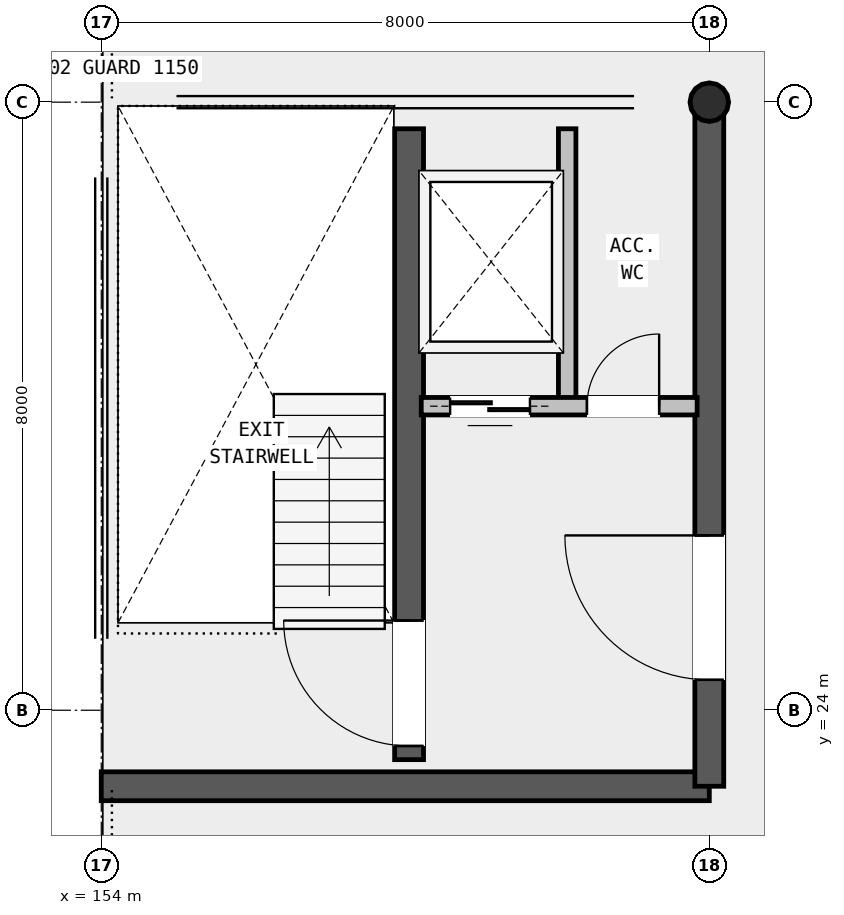
"""IFC4 building model, lengths in metres.
Left out: names, types, materials, properties, quantities, classifications, styles, units other than length and angle.
Written with IfcOpenShell. Run it as: python <this file> out.ifc"""

import sys

from ifc_helpers import new_model, si_unit, direction, frame, frame_2d, origin, origin_2d, place, context, subcontext, project, spatial, rectangle, hollow_circle, extrude, element, fill, save


model = new_model("IFC4")
c1 = context("Model", 3, precision=1e-05, world=origin(), true_north=direction((0.0, 1.0)))
c2 = subcontext(c1, "Body", "Model", "MODEL_VIEW")
j1 = project(units=[si_unit("LENGTHUNIT", "METRE"), si_unit("PLANEANGLEUNIT", "RADIAN")], contexts=[c1])
p1 = place(None, origin())
s1 = spatial("IfcSite", under=j1, at=p1, CompositionType="ELEMENT")
p2 = place(p1, origin())
s2 = spatial("IfcBuilding", under=s1, at=p2, CompositionType="ELEMENT")
p3 = place(p2, frame((0.0, 0.0, 17.3)))
s3 = spatial("IfcBuildingStorey", under=s2, at=p3, CompositionType="ELEMENT", Elevation=17.3)
p4 = place(p3, frame((162.0, 32.0, 0.0), z_axis=(0.0, 0.0, 1.0), x_axis=(1.0, 0.0, 0.0)))
e1 = element("IfcColumn", 1, at=p4, inside=s3, PredefinedType="COLUMN", context=c2, shape_type="SweptSolid", body=[
    extrude(hollow_circle(Radius=0.254, WallThickness=0.016, at=origin_2d()), origin(), (0.0, 0.0, 1.0), 3.1),
])
p5 = place(p3, frame((154.0, 23.0, 0.0), z_axis=(0.0, 0.0, 1.0), x_axis=(1.0, 0.0, 0.0)))
e2 = element("IfcWall", 2, at=p5, inside=s3, PredefinedType="SHEAR", context=c2, shape_type="SweptSolid", body=[
    extrude(rectangle(XDim=8.0, YDim=0.38, at=frame_2d((4.0, 0.0))), origin(), (0.0, 0.0, 1.0), 2.4),
])
p6 = place(p3, frame((162.0, 23.0, 0.0), z_axis=(0.0, 0.0, 1.0), x_axis=(0.0, 1.0, 0.0)))
e3 = element("IfcWall", 3, at=p6, inside=s3, PredefinedType="SHEAR", context=c2, shape_type="SweptSolid", body=[
    extrude(rectangle(XDim=9.0, YDim=0.38, at=frame_2d((4.5, 0.0))), origin(), (0.0, 0.0, 1.0), 2.4),
])
p7 = place(p6, frame((1.4, 0.0, 0.0)))
e4 = element("IfcOpeningElement", 4, at=p7, cuts=e3, PredefinedType="OPENING", context=c2, shape_type="SweptSolid", body=[
    extrude(rectangle(XDim=1.9, YDim=2.3, at=frame_2d((0.95, 1.15))), frame((0.0, 0.2, 0.0), z_axis=(0.0, -1.0, 0.0), x_axis=(1.0, 0.0, 0.0)), (0.0, 0.0, 1.0), 0.4),
])
p8 = place(p3, frame((158.05, 23.35, 0.0), z_axis=(0.0, 0.0, 1.0), x_axis=(0.0, 1.0, 0.0)))
e5 = element("IfcWall", 5, at=p8, inside=s3, PredefinedType="SHEAR", context=c2, shape_type="SweptSolid", body=[
    extrude(rectangle(XDim=8.3, YDim=0.38, at=frame_2d((4.15, 0.0))), origin(), (0.0, 0.0, 1.0), 2.4),
])
p9 = place(p8, frame((0.18, 0.0, 0.0)))
e6 = element("IfcOpeningElement", 6, at=p9, cuts=e5, PredefinedType="OPENING", context=c2, shape_type="SweptSolid", body=[
    extrude(rectangle(XDim=1.65, YDim=2.2, at=frame_2d((0.825, 1.1))), frame((0.0, 0.2, 0.0), z_axis=(0.0, -1.0, 0.0), x_axis=(1.0, 0.0, 0.0)), (0.0, 0.0, 1.0), 0.4),
])
p10 = place(p3, frame((160.13, 28.0, 0.0), z_axis=(0.0, 0.0, 1.0), x_axis=(0.0, 1.0, 0.0)))
e7 = element("IfcWall", 7, at=p10, inside=s3, PredefinedType="PARTITIONING", context=c2, shape_type="SweptSolid", body=[
    extrude(rectangle(XDim=3.65, YDim=0.23, at=frame_2d((1.825, 0.0))), origin(), (0.0, 0.0, 1.0), 2.4),
])
p11 = place(p3, frame((158.21, 28.0, 0.0), z_axis=(0.0, 0.0, 1.0), x_axis=(1.0, 0.0, 0.0)))
e8 = element("IfcWall", 8, at=p11, inside=s3, PredefinedType="PARTITIONING", context=c2, shape_type="SweptSolid", body=[
    extrude(rectangle(XDim=3.63, YDim=0.23, at=frame_2d((1.815, 0.0))), origin(), (0.0, 0.0, 1.0), 2.4),
])
p12 = place(p11, frame((0.38, 0.0, 0.0)))
e9 = element("IfcOpeningElement", 9, at=p12, cuts=e8, PredefinedType="OPENING", context=c2, shape_type="SweptSolid", body=[
    extrude(rectangle(XDim=1.05, YDim=2.15, at=frame_2d((0.525, 1.075))), frame((0.0, 0.125, 0.0), z_axis=(0.0, -1.0, 0.0), x_axis=(1.0, 0.0, 0.0)), (0.0, 0.0, 1.0), 0.25),
])
p13 = place(p11, frame((2.18, 0.0, 0.0)))
e10 = element("IfcOpeningElement", 10, at=p13, cuts=e8, PredefinedType="OPENING", context=c2, shape_type="SweptSolid", body=[
    extrude(rectangle(XDim=0.95, YDim=2.1, at=frame_2d((0.475, 1.05))), frame((0.0, 0.125, 0.0), z_axis=(0.0, -1.0, 0.0), x_axis=(1.0, 0.0, 0.0)), (0.0, 0.0, 1.0), 0.25),
])
p14 = place(p7, origin())
e11 = element("IfcDoor", 11, at=p14, inside=s3, OperationType="SINGLE_SWING_RIGHT", PredefinedType="DOOR", context=c2, shape_type="SweptSolid", body=[
    extrude(rectangle(XDim=1.9, YDim=2.3, at=frame_2d((0.95, 1.15))), frame((0.0, 0.025, 0.0), z_axis=(0.0, -1.0, 0.0), x_axis=(1.0, 0.0, 0.0)), (0.0, 0.0, 1.0), 0.05),
])
fill(e4, e11)
p15 = place(p9, origin())
e12 = element("IfcDoor", 12, at=p15, inside=s3, OperationType="SINGLE_SWING_RIGHT", PredefinedType="DOOR", context=c2, shape_type="SweptSolid", body=[
    extrude(rectangle(XDim=1.65, YDim=2.2, at=frame_2d((0.825, 1.1))), frame((0.0, 0.025, 0.0), z_axis=(0.0, -1.0, 0.0), x_axis=(1.0, 0.0, 0.0)), (0.0, 0.0, 1.0), 0.05),
])
fill(e6, e12)
p16 = place(p12, origin())
e13 = element("IfcDoor", 13, at=p16, inside=s3, OperationType="SLIDING_TO_LEFT", PredefinedType="DOOR", context=c2, shape_type="SweptSolid", body=[
    extrude(rectangle(XDim=1.05, YDim=2.15, at=frame_2d((0.525, 1.075))), frame((0.0, 0.025, 0.0), z_axis=(0.0, -1.0, 0.0), x_axis=(1.0, 0.0, 0.0)), (0.0, 0.0, 1.0), 0.05),
])
fill(e9, e13)
p17 = place(p13, origin())
e14 = element("IfcDoor", 14, at=p17, inside=s3, OperationType="SINGLE_SWING_RIGHT", PredefinedType="DOOR", context=c2, shape_type="SweptSolid", body=[
    extrude(rectangle(XDim=0.95, YDim=2.1, at=frame_2d((0.475, 1.05))), frame((0.0, 0.025, 0.0), z_axis=(0.0, -1.0, 0.0), x_axis=(1.0, 0.0, 0.0)), (0.0, 0.0, 1.0), 0.05),
])
fill(e10, e14)
save(model, sys.argv[1])
